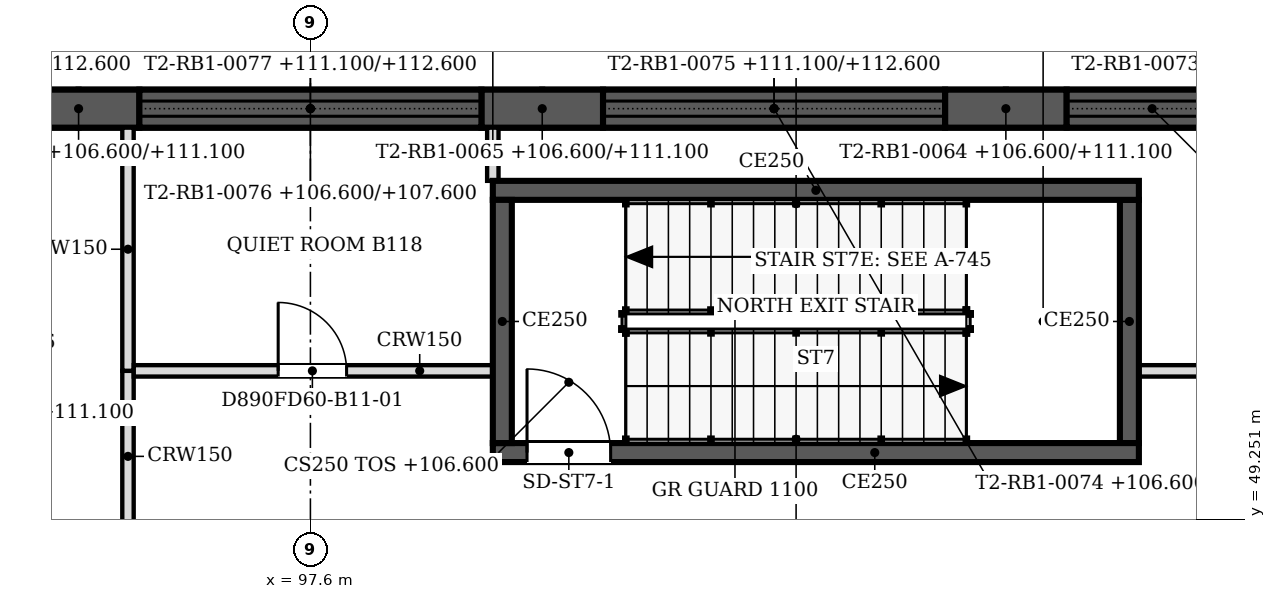
"""IFC4 building model, lengths in metres.
Left out: names, types, materials, properties, quantities, classifications, styles, units other than length and angle.
Written with IfcOpenShell. Run it as: python <this file> out.ifc"""

import sys

from ifc_helpers import new_model, si_unit, direction, frame, frame_2d, origin, place, context, subcontext, project, spatial, polyline, rectangle, outline, extrude, faceted_brep, source, transform, mapped, element, fill, save


model = new_model("IFC4")
c1 = context("Model", 3, precision=1e-05, world=origin(), true_north=direction((0.0, 1.0)))
c2 = subcontext(c1, "Body", "Model", "MODEL_VIEW")
j1 = project(units=[si_unit("LENGTHUNIT", "METRE"), si_unit("PLANEANGLEUNIT", "RADIAN")], contexts=[c1])
p1 = place(None, origin())
s1 = spatial("IfcSite", under=j1, at=p1, CompositionType="ELEMENT")
p2 = place(p1, origin())
s2 = spatial("IfcBuilding", under=s1, at=p2, CompositionType="ELEMENT")
p3 = place(p2, frame((0.0, 0.0, 106.6)))
s3 = spatial("IfcBuildingStorey", under=s2, at=p3, CompositionType="ELEMENT", Elevation=106.6)
m1 = source(origin(), c2, "Body", "SweptSolid", [
    extrude(outline(polyline([(0.0, 0.0), (1.6, 0.0), (1.6, 4.5), (0.0, 4.5), (0.0, 0.0)])), frame((0.0, 0.25, 0.0), z_axis=(0.0, -1.0, 0.0), x_axis=(1.0, 0.0, 0.0)), (0.0, 0.0, 1.0), 0.5),
])
p4 = place(p3, frame((107.55, 54.65, 0.0), z_axis=(0.0, 0.0, 1.0), x_axis=(-1.0, 0.0, 0.0)))
e1 = element("IfcWall", 1, at=p4, inside=s3, PredefinedType="SOLIDWALL", context=c2, shape_type="MappedRepresentation", body=[
    mapped(m1, transform((0.0, 0.0, 0.0), scale=1.0)),
])
m2 = source(origin(), c2, "Body", "Brep", [
    faceted_brep([(0.0, -0.25, 0.0), (1.6, -0.25, 0.0), (1.6, -0.25, 4.5), (0.0, -0.25, 4.5), (0.0, 0.25, 4.5), (1.6, 0.25, 4.5), (1.6, 0.25, 0.0), (0.0, 0.25, 0.0)], [[[0, 1, 2, 3]], [[4, 5, 6, 7]], [[7, 6, 1, 0]], [[5, 4, 3, 2]], [[4, 7, 0, 3]], [[1, 6, 5, 2]]]),
])
p5 = place(p3, frame((101.45, 54.65, 0.0), z_axis=(0.0, 0.0, 1.0), x_axis=(-1.0, 0.0, 0.0)))
e2 = element("IfcWall", 2, at=p5, inside=s3, PredefinedType="SOLIDWALL", context=c2, shape_type="MappedRepresentation", body=[
    mapped(m2, transform((0.0, 0.0, 0.0), scale=1.0)),
])
p6 = place(p3, frame((95.35, 54.65, 0.0), z_axis=(0.0, 0.0, 1.0), x_axis=(-1.0, 0.0, 0.0)))
e3 = element("IfcWall", 3, at=p6, inside=s3, PredefinedType="SOLIDWALL", context=c2, shape_type="MappedRepresentation", body=[
    mapped(m1, transform((0.0, 0.0, 0.0), scale=1.0)),
])
m3 = source(origin(), c2, "Body", "SweptSolid", [
    extrude(outline(polyline([(0.0, 0.0), (4.5, 0.0), (4.5, 1.0), (0.0, 1.0), (0.0, 0.0)])), frame((0.0, 0.25, 0.0), z_axis=(0.0, -1.0, 0.0), x_axis=(1.0, 0.0, 0.0)), (0.0, 0.0, 1.0), 0.5),
])
p7 = place(p3, frame((112.05, 54.65, 0.0), z_axis=(0.0, 0.0, 1.0), x_axis=(-1.0, 0.0, 0.0)))
e4 = element("IfcWall", 4, at=p7, inside=s3, PredefinedType="SOLIDWALL", context=c2, shape_type="MappedRepresentation", body=[
    mapped(m3, transform((0.0, 0.0, 0.0), scale=1.0)),
])
m4 = source(origin(), c2, "Body", "SweptSolid", [
    extrude(outline(polyline([(0.0, 0.0), (6.1, 0.0), (6.1, 1.5), (0.0, 1.5), (0.0, 0.0)])), frame((0.0, 0.25, 0.0), z_axis=(0.0, -1.0, 0.0), x_axis=(1.0, 0.0, 0.0)), (0.0, 0.0, 1.0), 0.5),
])
p8 = place(p3, frame((112.85, 54.65, 4.5), z_axis=(0.0, 0.0, 1.0), x_axis=(-1.0, 0.0, 0.0)))
e5 = element("IfcWall", 5, at=p8, inside=s3, PredefinedType="SOLIDWALL", context=c2, shape_type="MappedRepresentation", body=[
    mapped(m4, transform((0.0, 0.0, 0.0), scale=1.0)),
])
p9 = place(p3, frame((105.95, 54.65, 0.0), z_axis=(0.0, 0.0, 1.0), x_axis=(-1.0, 0.0, 0.0)))
e6 = element("IfcWall", 6, at=p9, inside=s3, PredefinedType="SOLIDWALL", context=c2, shape_type="MappedRepresentation", body=[
    mapped(m3, transform((0.0, 0.0, 0.0), scale=1.0)),
])
p10 = place(p3, frame((106.75, 54.65, 4.5), z_axis=(0.0, 0.0, 1.0), x_axis=(-1.0, 0.0, 0.0)))
e7 = element("IfcWall", 7, at=p10, inside=s3, PredefinedType="SOLIDWALL", context=c2, shape_type="MappedRepresentation", body=[
    mapped(m4, transform((0.0, 0.0, 0.0), scale=1.0)),
])
p11 = place(p3, frame((99.85, 54.65, 0.0), z_axis=(0.0, 0.0, 1.0), x_axis=(-1.0, 0.0, 0.0)))
e8 = element("IfcWall", 8, at=p11, inside=s3, PredefinedType="SOLIDWALL", context=c2, shape_type="MappedRepresentation", body=[
    mapped(m3, transform((0.0, 0.0, 0.0), scale=1.0)),
])
m5 = source(origin(), c2, "Body", "Brep", [
    faceted_brep([(0.0, -0.25, 0.0), (6.1, -0.25, 0.0), (6.1, -0.25, 1.5), (0.0, -0.25, 1.5), (0.0, 0.25, 1.5), (6.1, 0.25, 1.5), (6.1, 0.25, 0.0), (0.0, 0.25, 0.0)], [[[0, 1, 2, 3]], [[4, 5, 6, 7]], [[7, 6, 1, 0]], [[5, 4, 3, 2]], [[4, 7, 0, 3]], [[1, 6, 5, 2]]]),
])
p12 = place(p3, frame((100.65, 54.65, 4.5), z_axis=(0.0, 0.0, 1.0), x_axis=(-1.0, 0.0, 0.0)))
e9 = element("IfcWall", 9, at=p12, inside=s3, PredefinedType="SOLIDWALL", context=c2, shape_type="MappedRepresentation", body=[
    mapped(m5, transform((0.0, 0.0, 0.0), scale=1.0)),
])
m6 = source(origin(), c2, "Body", "Brep", [
    faceted_brep([(0.0, -0.25, 0.0), (3.003, -0.25, 0.0), (3.003, -0.25, 1.5), (0.0, -0.25, 1.5), (0.0, 0.25, 1.5), (2.957, 0.25, 1.5), (2.957, 0.25, 0.0), (0.0, 0.25, 0.0), (3.003, 0.0, 0.0), (3.003, 0.0, 1.5)], [[[0, 1, 2, 3]], [[4, 5, 6, 7]], [[7, 6, 8, 1, 0]], [[9, 2, 1, 8]], [[5, 4, 3, 2, 9]], [[4, 7, 0, 3]], [[8, 6, 5, 9]]]),
])
p13 = place(p3, frame((94.55, 54.65, 4.5), z_axis=(0.0, 0.0, 1.0), x_axis=(-1.0, 0.0, 0.0)))
e10 = element("IfcWall", 10, at=p13, inside=s3, PredefinedType="SOLIDWALL", context=c2, shape_type="MappedRepresentation", body=[
    mapped(m6, transform((0.0, 0.0, 0.0), scale=1.0)),
])
p14 = place(p3, frame((108.5, 50.125, 0.0), z_axis=(0.0, 0.0, 1.0), x_axis=(-1.0, 0.0, 0.0)))
e11 = element("IfcWall", 11, at=p14, inside=s3, PredefinedType="SOLIDWALL", context=c2, shape_type="SweptSolid", body=[
    extrude(rectangle(XDim=8.5, YDim=0.25, at=frame_2d((4.25, 0.0))), origin(), (0.0, 0.0, 1.0), 6.0),
])
m7 = source(origin(), c2, "Body", "SweptSolid", [
    extrude(rectangle(XDim=1.1, YDim=2.1, at=frame_2d((0.55, 1.05))), frame((0.0, 0.135, 0.0), z_axis=(0.0, -1.0, 0.0), x_axis=(1.0, 0.0, 0.0)), (0.0, 0.0, 1.0), 0.27),
])
p15 = place(p14, frame((6.95, 0.0, 0.0)))
e12 = element("IfcOpeningElement", 12, at=p15, cuts=e11, PredefinedType="OPENING", context=c2, shape_type="MappedRepresentation", body=[
    mapped(m7, transform((0.0, 0.0, 0.0), scale=1.0)),
])
p16 = place(p3, frame((100.125, 50.25, 0.0), z_axis=(0.0, 0.0, 1.0), x_axis=(0.0, 1.0, 0.0)))
e13 = element("IfcWall", 13, at=p16, inside=s3, PredefinedType="SOLIDWALL", context=c2, shape_type="SweptSolid", body=[
    extrude(rectangle(XDim=3.2, YDim=0.25, at=frame_2d((1.6, 0.0))), origin(), (0.0, 0.0, 1.0), 6.0),
])
p17 = place(p3, frame((100.0, 53.575, 0.0), z_axis=(0.0, 0.0, 1.0), x_axis=(1.0, 0.0, 0.0)))
e14 = element("IfcWall", 14, at=p17, inside=s3, PredefinedType="SOLIDWALL", context=c2, shape_type="SweptSolid", body=[
    extrude(rectangle(XDim=8.5, YDim=0.25, at=frame_2d((4.25, 0.0))), origin(), (0.0, 0.0, 1.0), 6.0),
])
p18 = place(p3, frame((108.375, 53.45, 0.0), z_axis=(0.0, 0.0, 1.0), x_axis=(0.0, -1.0, 0.0)))
e15 = element("IfcWall", 15, at=p18, inside=s3, PredefinedType="SOLIDWALL", context=c2, shape_type="SweptSolid", body=[
    extrude(rectangle(XDim=3.2, YDim=0.25, at=frame_2d((1.6, 0.0))), origin(), (0.0, 0.0, 1.0), 6.0),
])
p19 = place(p3, frame((95.2, 45.75, 0.0), z_axis=(0.0, 0.0, 1.0), x_axis=(0.0, 1.0, 0.0)))
e16 = element("IfcWall", 16, at=p19, inside=s3, PredefinedType="PARTITIONING", context=c2, shape_type="SweptSolid", body=[
    extrude(rectangle(XDim=5.45, YDim=0.15, at=frame_2d((2.725, 0.0))), origin(), (0.0, 0.0, 1.0), 5.167),
])
m8 = source(origin(), c2, "Body", "SweptSolid", [
    extrude(rectangle(XDim=1.0, YDim=2.1, at=frame_2d((0.5, 1.05))), frame((0.0, 0.085, 0.0), z_axis=(0.0, -1.0, 0.0), x_axis=(1.0, 0.0, 0.0)), (0.0, 0.0, 1.0), 0.17),
])
p20 = place(p19, frame((2.2, 0.0, 0.0)))
e17 = element("IfcOpeningElement", 17, at=p20, cuts=e16, PredefinedType="OPENING", context=c2, shape_type="MappedRepresentation", body=[
    mapped(m8, transform((0.0, 0.0, 0.0), scale=1.0)),
])
p21 = place(p3, frame((95.2, 51.201, 0.0), z_axis=(0.0, 0.0, 1.0), x_axis=(0.0, 1.0, 0.0)))
e18 = element("IfcWall", 18, at=p21, inside=s3, PredefinedType="PARTITIONING", context=c2, shape_type="SweptSolid", body=[
    extrude(rectangle(XDim=3.199, YDim=0.15, at=frame_2d((1.6, 0.0))), origin(), (0.0, 0.0, 1.0), 5.167),
])
p22 = place(p3, frame((95.276, 51.2, 0.0), z_axis=(0.0, 0.0, 1.0), x_axis=(1.0, 0.0, 0.0)))
e19 = element("IfcWall", 19, at=p22, inside=s3, PredefinedType="PARTITIONING", context=c2, shape_type="SweptSolid", body=[
    extrude(rectangle(XDim=4.724, YDim=0.15, at=frame_2d((2.362, 0.0))), origin(), (0.0, 0.0, 1.0), 5.167),
])
m9 = source(origin(), c2, "Body", "SweptSolid", [
    extrude(rectangle(XDim=0.9, YDim=2.1, at=frame_2d((0.45, 1.05))), frame((0.0, 0.085, 0.0), z_axis=(0.0, -1.0, 0.0), x_axis=(1.0, 0.0, 0.0)), (0.0, 0.0, 1.0), 0.17),
])
p23 = place(p22, frame((1.9, 0.0, 0.0)))
e20 = element("IfcOpeningElement", 20, at=p23, cuts=e19, PredefinedType="OPENING", context=c2, shape_type="MappedRepresentation", body=[
    mapped(m9, transform((0.0, 0.0, 0.0), scale=1.0)),
])
p24 = place(p3, frame((108.5, 51.2, 0.0), z_axis=(0.0, 0.0, 1.0), x_axis=(1.0, 0.0, 0.0)))
e21 = element("IfcWall", 21, at=p24, inside=s3, PredefinedType="PARTITIONING", context=c2, shape_type="SweptSolid", body=[
    extrude(rectangle(XDim=13.5, YDim=0.15, at=frame_2d((6.75, 0.0))), origin(), (0.0, 0.0, 1.0), 5.167),
])
p25 = place(p3, frame((100.0, 53.7, 0.0), z_axis=(0.0, 0.0, 1.0), x_axis=(0.0, 1.0, 0.0)))
e22 = element("IfcWall", 22, at=p25, inside=s3, PredefinedType="PARTITIONING", context=c2, shape_type="SweptSolid", body=[
    extrude(rectangle(XDim=0.7, YDim=0.15, at=frame_2d((0.35, 0.0))), origin(), (0.0, 0.0, 1.0), 5.167),
])
m10 = source(origin(), c2, "Body", "SweptSolid", [
    extrude(rectangle(XDim=1.1, YDim=2.1, at=frame_2d((0.55, 1.05))), frame((0.0, 0.025, 0.0), z_axis=(0.0, -1.0, 0.0), x_axis=(1.0, 0.0, 0.0)), (0.0, 0.0, 1.0), 0.05),
])
p26 = place(p15, origin())
e23 = element("IfcDoor", 23, at=p26, inside=s3, OperationType="SINGLE_SWING_RIGHT", PredefinedType="DOOR", context=c2, shape_type="MappedRepresentation", body=[
    mapped(m10, transform((0.0, 0.0, 0.0), scale=1.0)),
])
fill(e12, e23)
m11 = source(origin(), c2, "Body", "SweptSolid", [
    extrude(rectangle(XDim=0.9, YDim=2.1, at=frame_2d((0.45, 1.05))), frame((0.0, 0.025, 0.0), z_axis=(0.0, -1.0, 0.0), x_axis=(1.0, 0.0, 0.0)), (0.0, 0.0, 1.0), 0.05),
])
p27 = place(p23, origin())
e24 = element("IfcDoor", 24, at=p27, inside=s3, OperationType="SINGLE_SWING_LEFT", PredefinedType="DOOR", context=c2, shape_type="MappedRepresentation", body=[
    mapped(m11, transform((0.0, 0.0, 0.0), scale=1.0)),
])
fill(e20, e24)
save(model, sys.argv[1])
